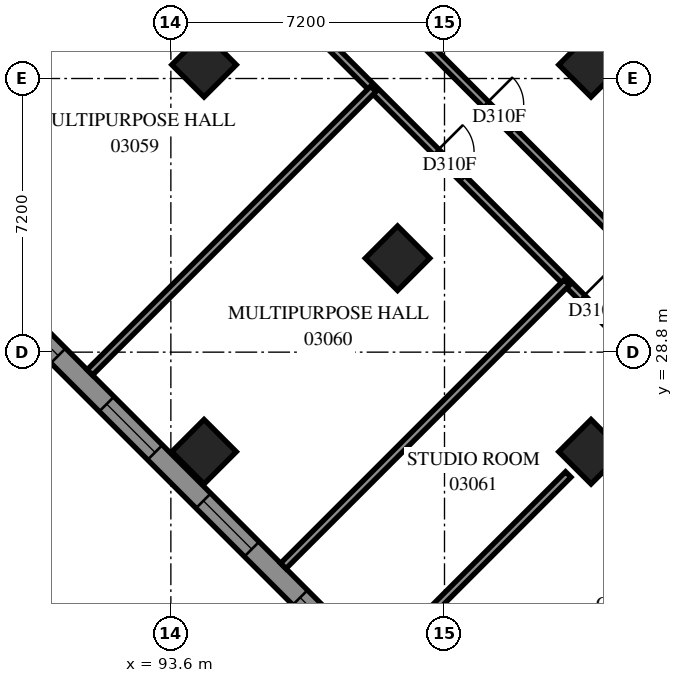
"""IFC4 building model, lengths in metres.
Left out: names, types, materials, properties, quantities, classifications, styles, units other than length and angle.
Written with IfcOpenShell. Run it as: python <this file> out.ifc"""

import sys

from ifc_helpers import new_model, si_unit, direction, frame, frame_2d, origin, origin_2d, place, context, subcontext, project, spatial, polyline, rectangle, outline, extrude, element, fill, save


model = new_model("IFC4")
c1 = context("Model", 3, precision=1e-05, world=origin(), true_north=direction((0.0, 1.0)))
c2 = subcontext(c1, "Body", "Model", "MODEL_VIEW")
j1 = project(units=[si_unit("LENGTHUNIT", "METRE"), si_unit("PLANEANGLEUNIT", "RADIAN")], contexts=[c1])
p1 = place(None, origin())
s1 = spatial("IfcSite", under=j1, at=p1, CompositionType="ELEMENT")
p2 = place(p1, origin())
s2 = spatial("IfcBuilding", under=s1, at=p2, CompositionType="ELEMENT")
p3 = place(p2, frame((0.0, 0.0, 14.4)))
s3 = spatial("IfcBuildingStorey", under=s2, at=p3, CompositionType="ELEMENT", Elevation=14.4)
for number, where, z_axis, x_axis in (
    (1, (94.474, 36.362, 0.0), (0.0, 0.0, 1.0), (0.707, -0.707, 0.0)),
    (2, (104.656, 36.362, 0.0), (0.0, 0.0, 1.0), (0.707, -0.707, 0.0)),
    (3, (99.565, 31.271, 0.0), (0.0, 0.0, 1.0), (0.707, -0.707, 0.0)),
    (4, (94.474, 26.18, 0.0), (0.0, 0.0, 1.0), (0.707, -0.707, 0.0)),
    (5, (104.656, 26.18, 0.0), (0.0, 0.0, 1.0), (0.707, -0.707, 0.0)),
):
    element("IfcColumn", number, at=place(p3, frame(where, z_axis=z_axis, x_axis=x_axis)), inside=s3, PredefinedType="COLUMN", context=c2, shape_type="SweptSolid", body=[
        extrude(rectangle(XDim=1.2, YDim=1.2, at=origin_2d()), origin(), (0.0, 0.0, 1.0), 3.8),
    ])
p4 = place(p3, frame((104.656, 14.689, 0.0), z_axis=(0.0, 0.0, 1.0), x_axis=(0.7071094621, 0.7071041002, 0.0)))
e6 = element("IfcWall", 6, at=p4, inside=s3, PredefinedType="SOLIDWALL", context=c2, shape_type="SweptSolid", body=[
    extrude(outline(polyline([(-0.275, -0.275), (18.925, -0.275), (18.375, 0.275), (0.275, 0.275), (-0.275, -0.275)])), origin(), (0.0, 0.0, 1.0), 3.8),
])
p5 = place(p4, frame((1.825, 0.0, 0.7)))
e7 = element("IfcOpeningElement", 7, at=p5, cuts=e6, PredefinedType="OPENING", context=c2, shape_type="SweptSolid", body=[
    extrude(rectangle(XDim=1.8, YDim=2.6, at=frame_2d((0.9, 1.3))), frame((0.0, 0.285, 0.0), z_axis=(0.0, -1.0, 0.0), x_axis=(1.0, 0.0, 0.0)), (0.0, 0.0, 1.0), 0.57),
])
p6 = place(p4, frame((5.425, 0.0, 0.7)))
e8 = element("IfcOpeningElement", 8, at=p6, cuts=e6, PredefinedType="OPENING", context=c2, shape_type="SweptSolid", body=[
    extrude(rectangle(XDim=1.8, YDim=2.6, at=frame_2d((0.9, 1.3))), frame((0.0, 0.285, 0.0), z_axis=(0.0, -1.0, 0.0), x_axis=(1.0, 0.0, 0.0)), (0.0, 0.0, 1.0), 0.57),
])
p7 = place(p4, frame((8.875, 0.0, 0.7)))
e9 = element("IfcOpeningElement", 9, at=p7, cuts=e6, PredefinedType="OPENING", context=c2, shape_type="SweptSolid", body=[
    extrude(rectangle(XDim=1.8, YDim=2.6, at=frame_2d((0.9, 1.3))), frame((0.0, 0.285, 0.0), z_axis=(0.0, -1.0, 0.0), x_axis=(1.0, 0.0, 0.0)), (0.0, 0.0, 1.0), 0.57),
])
p8 = place(p4, frame((12.775, 0.0, 0.7)))
e10 = element("IfcOpeningElement", 10, at=p8, cuts=e6, PredefinedType="OPENING", context=c2, shape_type="SweptSolid", body=[
    extrude(rectangle(XDim=1.8, YDim=2.6, at=frame_2d((0.9, 1.3))), frame((0.0, 0.285, 0.0), z_axis=(0.0, -1.0, 0.0), x_axis=(1.0, 0.0, 0.0)), (0.0, 0.0, 1.0), 0.57),
])
p9 = place(p4, frame((16.05, 0.0, 0.7)))
e11 = element("IfcOpeningElement", 11, at=p9, cuts=e6, PredefinedType="OPENING", context=c2, shape_type="SweptSolid", body=[
    extrude(rectangle(XDim=1.8, YDim=2.6, at=frame_2d((0.9, 1.3))), frame((0.0, 0.285, 0.0), z_axis=(0.0, -1.0, 0.0), x_axis=(1.0, 0.0, 0.0)), (0.0, 0.0, 1.0), 0.57),
])
p10 = place(p3, frame((117.843, 34.665, 0.0), z_axis=(0.0, 0.0, 1.0), x_axis=(-0.7071067812, 0.7071067812, 0.0)))
e12 = element("IfcWall", 12, at=p10, inside=s3, PredefinedType="SOLIDWALL", context=c2, shape_type="SweptSolid", body=[
    extrude(outline(polyline([(-0.275, -0.275), (54.222, -0.275), (53.994, 0.275), (0.275, 0.275), (-0.275, -0.275)])), origin(), (0.0, 0.0, 1.0), 3.8),
])
p11 = place(p10, frame((0.8, 0.0, 0.7)))
e13 = element("IfcOpeningElement", 13, at=p11, cuts=e12, PredefinedType="OPENING", context=c2, shape_type="SweptSolid", body=[
    extrude(rectangle(XDim=1.8, YDim=2.6, at=frame_2d((0.9, 1.3))), frame((0.0, 0.285, 0.0), z_axis=(0.0, -1.0, 0.0), x_axis=(1.0, 0.0, 0.0)), (0.0, 0.0, 1.0), 0.57),
])
p12 = place(p10, frame((4.225, 0.0, 0.7)))
e14 = element("IfcOpeningElement", 14, at=p12, cuts=e12, PredefinedType="OPENING", context=c2, shape_type="SweptSolid", body=[
    extrude(rectangle(XDim=1.8, YDim=2.6, at=frame_2d((0.9, 1.3))), frame((0.0, 0.285, 0.0), z_axis=(0.0, -1.0, 0.0), x_axis=(1.0, 0.0, 0.0)), (0.0, 0.0, 1.0), 0.57),
])
p13 = place(p10, frame((7.825, 0.0, 0.7)))
e15 = element("IfcOpeningElement", 15, at=p13, cuts=e12, PredefinedType="OPENING", context=c2, shape_type="SweptSolid", body=[
    extrude(rectangle(XDim=1.8, YDim=2.6, at=frame_2d((0.9, 1.3))), frame((0.0, 0.285, 0.0), z_axis=(0.0, -1.0, 0.0), x_axis=(1.0, 0.0, 0.0)), (0.0, 0.0, 1.0), 0.57),
])
p14 = place(p10, frame((11.425, 0.0, 0.7)))
e16 = element("IfcOpeningElement", 16, at=p14, cuts=e12, PredefinedType="OPENING", context=c2, shape_type="SweptSolid", body=[
    extrude(rectangle(XDim=1.8, YDim=2.6, at=frame_2d((0.9, 1.3))), frame((0.0, 0.285, 0.0), z_axis=(0.0, -1.0, 0.0), x_axis=(1.0, 0.0, 0.0)), (0.0, 0.0, 1.0), 0.57),
])
p15 = place(p10, frame((15.025, 0.0, 0.7)))
e17 = element("IfcOpeningElement", 17, at=p15, cuts=e12, PredefinedType="OPENING", context=c2, shape_type="SweptSolid", body=[
    extrude(rectangle(XDim=1.8, YDim=2.6, at=frame_2d((0.9, 1.3))), frame((0.0, 0.285, 0.0), z_axis=(0.0, -1.0, 0.0), x_axis=(1.0, 0.0, 0.0)), (0.0, 0.0, 1.0), 0.57),
])
p16 = place(p10, frame((18.625, 0.0, 0.7)))
e18 = element("IfcOpeningElement", 18, at=p16, cuts=e12, PredefinedType="OPENING", context=c2, shape_type="SweptSolid", body=[
    extrude(rectangle(XDim=1.8, YDim=2.6, at=frame_2d((0.9, 1.3))), frame((0.0, 0.285, 0.0), z_axis=(0.0, -1.0, 0.0), x_axis=(1.0, 0.0, 0.0)), (0.0, 0.0, 1.0), 0.57),
])
p17 = place(p10, frame((22.225, 0.0, 0.7)))
e19 = element("IfcOpeningElement", 19, at=p17, cuts=e12, PredefinedType="OPENING", context=c2, shape_type="SweptSolid", body=[
    extrude(rectangle(XDim=1.8, YDim=2.6, at=frame_2d((0.9, 1.3))), frame((0.0, 0.285, 0.0), z_axis=(0.0, -1.0, 0.0), x_axis=(1.0, 0.0, 0.0)), (0.0, 0.0, 1.0), 0.57),
])
p18 = place(p10, frame((25.825, 0.0, 0.7)))
e20 = element("IfcOpeningElement", 20, at=p18, cuts=e12, PredefinedType="OPENING", context=c2, shape_type="SweptSolid", body=[
    extrude(rectangle(XDim=1.8, YDim=2.6, at=frame_2d((0.9, 1.3))), frame((0.0, 0.285, 0.0), z_axis=(0.0, -1.0, 0.0), x_axis=(1.0, 0.0, 0.0)), (0.0, 0.0, 1.0), 0.57),
])
p19 = place(p10, frame((29.425, 0.0, 0.7)))
e21 = element("IfcOpeningElement", 21, at=p19, cuts=e12, PredefinedType="OPENING", context=c2, shape_type="SweptSolid", body=[
    extrude(rectangle(XDim=1.8, YDim=2.6, at=frame_2d((0.9, 1.3))), frame((0.0, 0.285, 0.0), z_axis=(0.0, -1.0, 0.0), x_axis=(1.0, 0.0, 0.0)), (0.0, 0.0, 1.0), 0.57),
])
p20 = place(p10, frame((33.025, 0.0, 0.7)))
e22 = element("IfcOpeningElement", 22, at=p20, cuts=e12, PredefinedType="OPENING", context=c2, shape_type="SweptSolid", body=[
    extrude(rectangle(XDim=1.8, YDim=2.6, at=frame_2d((0.9, 1.3))), frame((0.0, 0.285, 0.0), z_axis=(0.0, -1.0, 0.0), x_axis=(1.0, 0.0, 0.0)), (0.0, 0.0, 1.0), 0.57),
])
p21 = place(p10, frame((36.625, 0.0, 0.7)))
e23 = element("IfcOpeningElement", 23, at=p21, cuts=e12, PredefinedType="OPENING", context=c2, shape_type="SweptSolid", body=[
    extrude(rectangle(XDim=1.8, YDim=2.6, at=frame_2d((0.9, 1.3))), frame((0.0, 0.285, 0.0), z_axis=(0.0, -1.0, 0.0), x_axis=(1.0, 0.0, 0.0)), (0.0, 0.0, 1.0), 0.57),
])
p22 = place(p10, frame((40.225, 0.0, 0.7)))
e24 = element("IfcOpeningElement", 24, at=p22, cuts=e12, PredefinedType="OPENING", context=c2, shape_type="SweptSolid", body=[
    extrude(rectangle(XDim=1.8, YDim=2.6, at=frame_2d((0.9, 1.3))), frame((0.0, 0.285, 0.0), z_axis=(0.0, -1.0, 0.0), x_axis=(1.0, 0.0, 0.0)), (0.0, 0.0, 1.0), 0.57),
])
p23 = place(p10, frame((43.825, 0.0, 0.7)))
e25 = element("IfcOpeningElement", 25, at=p23, cuts=e12, PredefinedType="OPENING", context=c2, shape_type="SweptSolid", body=[
    extrude(rectangle(XDim=1.8, YDim=2.6, at=frame_2d((0.9, 1.3))), frame((0.0, 0.285, 0.0), z_axis=(0.0, -1.0, 0.0), x_axis=(1.0, 0.0, 0.0)), (0.0, 0.0, 1.0), 0.57),
])
p24 = place(p10, frame((47.425, 0.0, 0.7)))
e26 = element("IfcOpeningElement", 26, at=p24, cuts=e12, PredefinedType="OPENING", context=c2, shape_type="SweptSolid", body=[
    extrude(rectangle(XDim=1.8, YDim=2.6, at=frame_2d((0.9, 1.3))), frame((0.0, 0.285, 0.0), z_axis=(0.0, -1.0, 0.0), x_axis=(1.0, 0.0, 0.0)), (0.0, 0.0, 1.0), 0.57),
])
p25 = place(p10, frame((51.06, 0.0, 0.7)))
e27 = element("IfcOpeningElement", 27, at=p25, cuts=e12, PredefinedType="OPENING", context=c2, shape_type="SweptSolid", body=[
    extrude(rectangle(XDim=1.8, YDim=2.6, at=frame_2d((0.9, 1.3))), frame((0.0, 0.285, 0.0), z_axis=(0.0, -1.0, 0.0), x_axis=(1.0, 0.0, 0.0)), (0.0, 0.0, 1.0), 0.57),
])
p26 = place(p3, frame((77.07, 42.275, 0.0), z_axis=(0.0, 0.0, 1.0), x_axis=(0.7071067812, -0.7071067812, 0.0)))
e28 = element("IfcWall", 28, at=p26, inside=s3, PredefinedType="SOLIDWALL", context=c2, shape_type="SweptSolid", body=[
    extrude(outline(polyline([(0.114, -0.275), (39.288, -0.275), (38.737, 0.275), (-0.114, 0.275), (0.114, -0.275)])), origin(), (0.0, 0.0, 1.0), 3.8),
])
p27 = place(p26, frame((2.837, 0.0, 0.7)))
e29 = element("IfcOpeningElement", 29, at=p27, cuts=e28, PredefinedType="OPENING", context=c2, shape_type="SweptSolid", body=[
    extrude(rectangle(XDim=1.8, YDim=2.6, at=frame_2d((0.9, 1.3))), frame((0.0, 0.285, 0.0), z_axis=(0.0, -1.0, 0.0), x_axis=(1.0, 0.0, 0.0)), (0.0, 0.0, 1.0), 0.57),
])
p28 = place(p26, frame((6.588, 0.0, 0.7)))
e30 = element("IfcOpeningElement", 30, at=p28, cuts=e28, PredefinedType="OPENING", context=c2, shape_type="SweptSolid", body=[
    extrude(rectangle(XDim=1.8, YDim=2.6, at=frame_2d((0.9, 1.3))), frame((0.0, 0.285, 0.0), z_axis=(0.0, -1.0, 0.0), x_axis=(1.0, 0.0, 0.0)), (0.0, 0.0, 1.0), 0.57),
])
p29 = place(p26, frame((10.188, 0.0, 0.7)))
e31 = element("IfcOpeningElement", 31, at=p29, cuts=e28, PredefinedType="OPENING", context=c2, shape_type="SweptSolid", body=[
    extrude(rectangle(XDim=1.8, YDim=2.6, at=frame_2d((0.9, 1.3))), frame((0.0, 0.285, 0.0), z_axis=(0.0, -1.0, 0.0), x_axis=(1.0, 0.0, 0.0)), (0.0, 0.0, 1.0), 0.57),
])
p30 = place(p26, frame((13.787, 0.0, 0.7)))
e32 = element("IfcOpeningElement", 32, at=p30, cuts=e28, PredefinedType="OPENING", context=c2, shape_type="SweptSolid", body=[
    extrude(rectangle(XDim=1.8, YDim=2.6, at=frame_2d((0.9, 1.3))), frame((0.0, 0.285, 0.0), z_axis=(0.0, -1.0, 0.0), x_axis=(1.0, 0.0, 0.0)), (0.0, 0.0, 1.0), 0.57),
])
p31 = place(p26, frame((17.387, 0.0, 0.7)))
e33 = element("IfcOpeningElement", 33, at=p31, cuts=e28, PredefinedType="OPENING", context=c2, shape_type="SweptSolid", body=[
    extrude(rectangle(XDim=1.8, YDim=2.6, at=frame_2d((0.9, 1.3))), frame((0.0, 0.285, 0.0), z_axis=(0.0, -1.0, 0.0), x_axis=(1.0, 0.0, 0.0)), (0.0, 0.0, 1.0), 0.57),
])
p32 = place(p26, frame((20.988, 0.0, 0.7)))
e34 = element("IfcOpeningElement", 34, at=p32, cuts=e28, PredefinedType="OPENING", context=c2, shape_type="SweptSolid", body=[
    extrude(rectangle(XDim=1.8, YDim=2.6, at=frame_2d((0.9, 1.3))), frame((0.0, 0.285, 0.0), z_axis=(0.0, -1.0, 0.0), x_axis=(1.0, 0.0, 0.0)), (0.0, 0.0, 1.0), 0.57),
])
p33 = place(p26, frame((24.587, 0.0, 0.7)))
e35 = element("IfcOpeningElement", 35, at=p33, cuts=e28, PredefinedType="OPENING", context=c2, shape_type="SweptSolid", body=[
    extrude(rectangle(XDim=1.8, YDim=2.6, at=frame_2d((0.9, 1.3))), frame((0.0, 0.285, 0.0), z_axis=(0.0, -1.0, 0.0), x_axis=(1.0, 0.0, 0.0)), (0.0, 0.0, 1.0), 0.57),
])
p34 = place(p26, frame((28.188, 0.0, 0.7)))
e36 = element("IfcOpeningElement", 36, at=p34, cuts=e28, PredefinedType="OPENING", context=c2, shape_type="SweptSolid", body=[
    extrude(rectangle(XDim=1.8, YDim=2.6, at=frame_2d((0.9, 1.3))), frame((0.0, 0.285, 0.0), z_axis=(0.0, -1.0, 0.0), x_axis=(1.0, 0.0, 0.0)), (0.0, 0.0, 1.0), 0.57),
])
p35 = place(p26, frame((31.788, 0.0, 0.7)))
e37 = element("IfcOpeningElement", 37, at=p35, cuts=e28, PredefinedType="OPENING", context=c2, shape_type="SweptSolid", body=[
    extrude(rectangle(XDim=1.8, YDim=2.6, at=frame_2d((0.9, 1.3))), frame((0.0, 0.285, 0.0), z_axis=(0.0, -1.0, 0.0), x_axis=(1.0, 0.0, 0.0)), (0.0, 0.0, 1.0), 0.57),
])
p36 = place(p26, frame((35.388, 0.0, 0.7)))
e38 = element("IfcOpeningElement", 38, at=p36, cuts=e28, PredefinedType="OPENING", context=c2, shape_type="SweptSolid", body=[
    extrude(rectangle(XDim=1.8, YDim=2.6, at=frame_2d((0.9, 1.3))), frame((0.0, 0.285, 0.0), z_axis=(0.0, -1.0, 0.0), x_axis=(1.0, 0.0, 0.0)), (0.0, 0.0, 1.0), 0.57),
])
p37 = place(p3, frame((93.835, 40.813, 0.0), z_axis=(0.0, 0.0, 1.0), x_axis=(0.7071067812, -0.7071067812, 0.0)))
e39 = element("IfcWall", 39, at=p37, inside=s3, PredefinedType="PARTITIONING", context=c2, shape_type="SweptSolid", body=[
    extrude(rectangle(XDim=25.198, YDim=0.2, at=frame_2d((12.599, 0.0))), origin(), (0.0, 0.0, 1.0), 3.8),
])
p38 = place(p37, frame((2.337, 0.0, 0.0)))
e40 = element("IfcOpeningElement", 40, at=p38, cuts=e39, PredefinedType="OPENING", context=c2, shape_type="SweptSolid", body=[
    extrude(rectangle(XDim=1.0, YDim=2.1, at=frame_2d((0.5, 1.05))), frame((0.0, 0.11, 0.0), z_axis=(0.0, -1.0, 0.0), x_axis=(1.0, 0.0, 0.0)), (0.0, 0.0, 1.0), 0.22),
])
p39 = place(p37, frame((9.537, 0.0, 0.0)))
e41 = element("IfcOpeningElement", 41, at=p39, cuts=e39, PredefinedType="OPENING", context=c2, shape_type="SweptSolid", body=[
    extrude(rectangle(XDim=1.0, YDim=2.1, at=frame_2d((0.5, 1.05))), frame((0.0, 0.11, 0.0), z_axis=(0.0, -1.0, 0.0), x_axis=(1.0, 0.0, 0.0)), (0.0, 0.0, 1.0), 0.22),
])
p40 = place(p37, frame((14.966, 0.0, 0.0)))
e42 = element("IfcOpeningElement", 42, at=p40, cuts=e39, PredefinedType="OPENING", context=c2, shape_type="SweptSolid", body=[
    extrude(rectangle(XDim=1.0, YDim=2.1, at=frame_2d((0.5, 1.05))), frame((0.0, 0.11, 0.0), z_axis=(0.0, -1.0, 0.0), x_axis=(1.0, 0.0, 0.0)), (0.0, 0.0, 1.0), 0.22),
])
p41 = place(p37, frame((21.861, 0.0, 0.0)))
e43 = element("IfcOpeningElement", 43, at=p41, cuts=e39, PredefinedType="OPENING", context=c2, shape_type="SweptSolid", body=[
    extrude(rectangle(XDim=1.0, YDim=2.1, at=frame_2d((0.5, 1.05))), frame((0.0, 0.11, 0.0), z_axis=(0.0, -1.0, 0.0), x_axis=(1.0, 0.0, 0.0)), (0.0, 0.0, 1.0), 0.22),
])
p42 = place(p3, frame((94.689, 42.517, 0.0), z_axis=(0.0, 0.0, 1.0), x_axis=(0.7071067812, -0.7071067812, 0.0)))
e44 = element("IfcWall", 44, at=p42, inside=s3, PredefinedType="PARTITIONING", context=c2, shape_type="SweptSolid", body=[
    extrude(rectangle(XDim=22.2, YDim=0.2, at=frame_2d((11.1, 0.0))), origin(), (0.0, 0.0, 1.0), 3.8),
])
p43 = place(p42, frame((2.974, 0.0, 0.0)))
e45 = element("IfcOpeningElement", 45, at=p43, cuts=e44, PredefinedType="OPENING", context=c2, shape_type="SweptSolid", body=[
    extrude(rectangle(XDim=1.0, YDim=2.1, at=frame_2d((0.5, 1.05))), frame((0.0, 0.11, 0.0), z_axis=(0.0, -1.0, 0.0), x_axis=(1.0, 0.0, 0.0)), (0.0, 0.0, 1.0), 0.22),
])
p44 = place(p42, frame((10.174, 0.0, 0.0)))
e46 = element("IfcOpeningElement", 46, at=p44, cuts=e44, PredefinedType="OPENING", context=c2, shape_type="SweptSolid", body=[
    extrude(rectangle(XDim=1.0, YDim=2.1, at=frame_2d((0.5, 1.05))), frame((0.0, 0.11, 0.0), z_axis=(0.0, -1.0, 0.0), x_axis=(1.0, 0.0, 0.0)), (0.0, 0.0, 1.0), 0.22),
])
p45 = place(p42, frame((17.374, 0.0, 0.0)))
e47 = element("IfcOpeningElement", 47, at=p45, cuts=e44, PredefinedType="OPENING", context=c2, shape_type="SweptSolid", body=[
    extrude(rectangle(XDim=1.0, YDim=2.1, at=frame_2d((0.5, 1.05))), frame((0.0, 0.11, 0.0), z_axis=(0.0, -1.0, 0.0), x_axis=(1.0, 0.0, 0.0)), (0.0, 0.0, 1.0), 0.22),
])
for number, where, z_axis, x_axis in (
    (48, (86.376, 33.357, 0.0), (0.0, 0.0, 1.0), (0.707, 0.707, 0.0)),
    (49, (96.559, 23.175, 0.0), (0.0, 0.0, 1.0), (0.707, 0.707, 0.0)),
    (50, (91.468, 28.266, 0.0), (0.0, 0.0, 1.0), (0.707, 0.707, 0.0)),
):
    element("IfcWall", number, at=place(p3, frame(where, z_axis=z_axis, x_axis=x_axis)), inside=s3, PredefinedType="PARTITIONING", context=c2, shape_type="SweptSolid", body=[
        extrude(rectangle(XDim=10.55, YDim=0.2, at=frame_2d((5.275, 0.0))), origin(), (0.0, 0.0, 1.0), 3.8),
    ])
p46 = place(p3, frame((86.836, 34.948, 0.0), z_axis=(0.0, 0.0, 1.0), x_axis=(0.7071067812, 0.7071067812, 0.0)))
e51 = element("IfcWall", 51, at=p46, inside=s3, PredefinedType="PARTITIONING", context=c2, shape_type="SweptSolid", body=[
    extrude(rectangle(XDim=9.099, YDim=0.2, at=frame_2d((4.55, 0.0))), origin(), (0.0, 0.0, 1.0), 3.8),
])
p47 = place(p3, frame((100.162, 21.688, 0.0), z_axis=(0.0, 0.0, 1.0), x_axis=(0.7071067812, 0.7071067812, 0.0)))
e52 = element("IfcWall", 52, at=p47, inside=s3, PredefinedType="PARTITIONING", context=c2, shape_type="SweptSolid", body=[
    extrude(rectangle(XDim=5.507, YDim=0.2, at=frame_2d((2.753, 0.0))), origin(), (0.0, 0.0, 1.0), 3.8),
])
p48 = place(p31, origin())
e53 = element("IfcWindow", 53, at=p48, inside=s3, PartitioningType="SINGLE_PANEL", PredefinedType="WINDOW", context=c2, shape_type="SweptSolid", body=[
    extrude(rectangle(XDim=1.8, YDim=2.6, at=frame_2d((0.9, 1.3))), frame((0.0, 0.155, 0.0), z_axis=(0.0, -1.0, 0.0), x_axis=(1.0, 0.0, 0.0)), (0.0, 0.0, 1.0), 0.06),
])
fill(e33, e53)
p49 = place(p32, origin())
e54 = element("IfcWindow", 54, at=p49, inside=s3, PartitioningType="SINGLE_PANEL", PredefinedType="WINDOW", context=c2, shape_type="SweptSolid", body=[
    extrude(rectangle(XDim=1.8, YDim=2.6, at=frame_2d((0.9, 1.3))), frame((0.0, 0.155, 0.0), z_axis=(0.0, -1.0, 0.0), x_axis=(1.0, 0.0, 0.0)), (0.0, 0.0, 1.0), 0.06),
])
fill(e34, e54)
p50 = place(p33, origin())
e55 = element("IfcWindow", 55, at=p50, inside=s3, PartitioningType="SINGLE_PANEL", PredefinedType="WINDOW", context=c2, shape_type="SweptSolid", body=[
    extrude(rectangle(XDim=1.8, YDim=2.6, at=frame_2d((0.9, 1.3))), frame((0.0, 0.155, 0.0), z_axis=(0.0, -1.0, 0.0), x_axis=(1.0, 0.0, 0.0)), (0.0, 0.0, 1.0), 0.06),
])
fill(e35, e55)
p51 = place(p34, origin())
e56 = element("IfcWindow", 56, at=p51, inside=s3, PartitioningType="SINGLE_PANEL", PredefinedType="WINDOW", context=c2, shape_type="SweptSolid", body=[
    extrude(rectangle(XDim=1.8, YDim=2.6, at=frame_2d((0.9, 1.3))), frame((0.0, 0.155, 0.0), z_axis=(0.0, -1.0, 0.0), x_axis=(1.0, 0.0, 0.0)), (0.0, 0.0, 1.0), 0.06),
])
fill(e36, e56)
p52 = place(p44, origin())
e57 = element("IfcDoor", 57, at=p52, inside=s3, OperationType="SINGLE_SWING_RIGHT", PredefinedType="DOOR", context=c2, shape_type="SweptSolid", body=[
    extrude(rectangle(XDim=1.0, YDim=2.1, at=frame_2d((0.5, 1.05))), frame((0.0, 0.025, 0.0), z_axis=(0.0, -1.0, 0.0), x_axis=(1.0, 0.0, 0.0)), (0.0, 0.0, 1.0), 0.05),
])
fill(e46, e57)
p53 = place(p39, origin())
e58 = element("IfcDoor", 58, at=p53, inside=s3, OperationType="SINGLE_SWING_LEFT", PredefinedType="DOOR", context=c2, shape_type="SweptSolid", body=[
    extrude(rectangle(XDim=1.0, YDim=2.1, at=frame_2d((0.5, 1.05))), frame((0.0, 0.025, 0.0), z_axis=(0.0, -1.0, 0.0), x_axis=(1.0, 0.0, 0.0)), (0.0, 0.0, 1.0), 0.05),
])
fill(e41, e58)
p54 = place(p40, origin())
e59 = element("IfcDoor", 59, at=p54, inside=s3, OperationType="SINGLE_SWING_LEFT", PredefinedType="DOOR", context=c2, shape_type="SweptSolid", body=[
    extrude(rectangle(XDim=1.0, YDim=2.1, at=frame_2d((0.5, 1.05))), frame((0.0, 0.025, 0.0), z_axis=(0.0, -1.0, 0.0), x_axis=(1.0, 0.0, 0.0)), (0.0, 0.0, 1.0), 0.05),
])
fill(e42, e59)
save(model, sys.argv[1])
